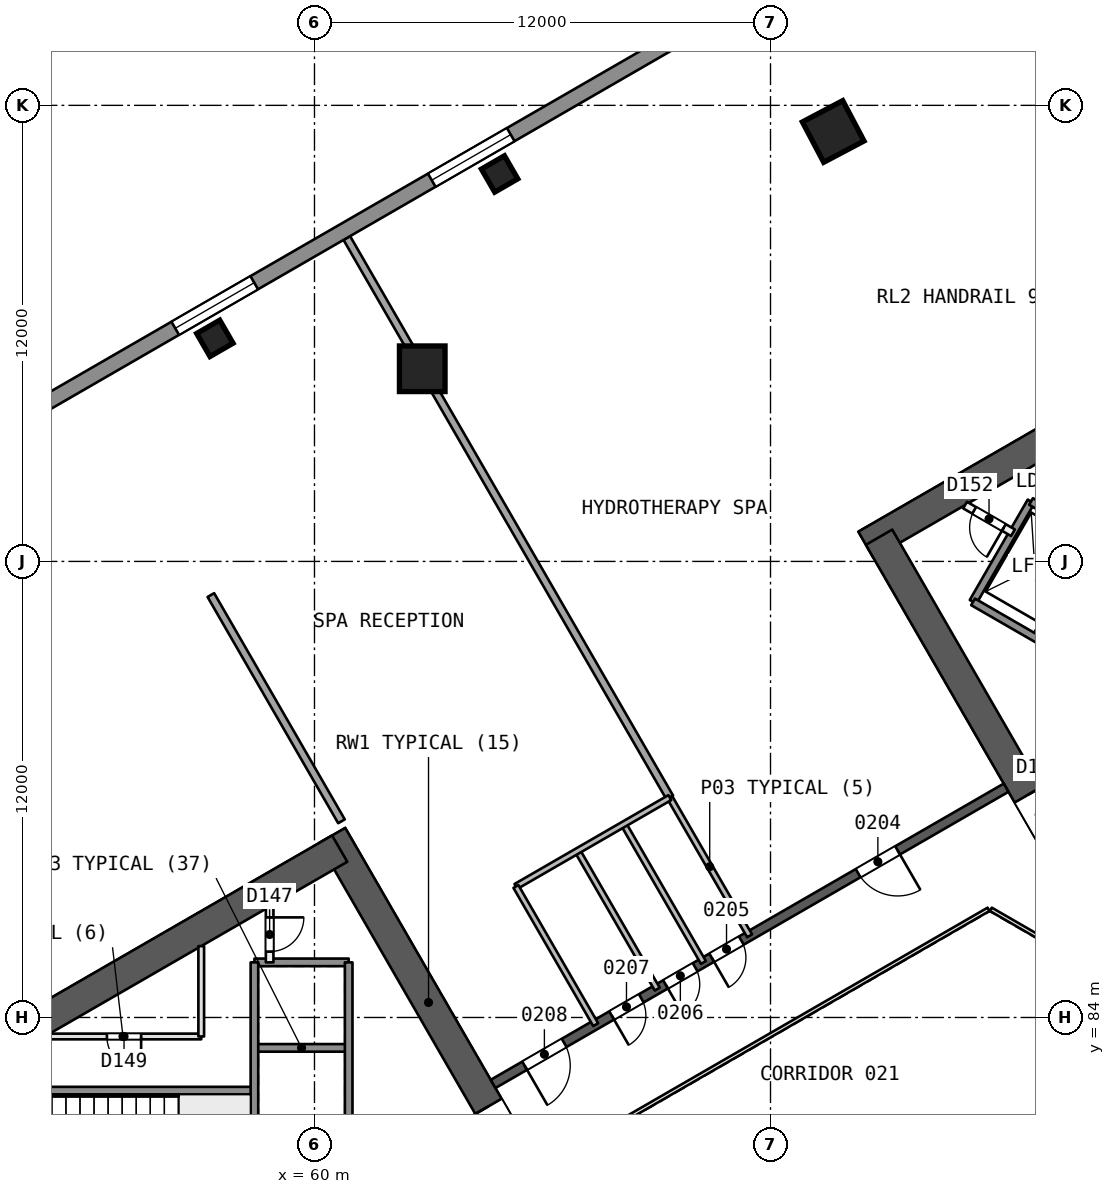
"""IFC4 building model, lengths in metres.
Left out: names, types, materials, properties, quantities, classifications, styles, units other than length and angle.
Written with IfcOpenShell. Run it as: python <this file> out.ifc"""

import sys

from ifc_helpers import new_model, si_unit, direction, frame, frame_2d, origin, origin_2d, place, context, subcontext, project, spatial, rectangle, extrude, element, fill, save


model = new_model("IFC4")
c1 = context("Model", 3, precision=1e-05, world=origin(), true_north=direction((0.0, 1.0)))
c2 = subcontext(c1, "Body", "Model", "MODEL_VIEW")
j1 = project(units=[si_unit("LENGTHUNIT", "METRE"), si_unit("PLANEANGLEUNIT", "RADIAN")], contexts=[c1])
p1 = place(None, origin())
s1 = spatial("IfcSite", under=j1, at=p1, CompositionType="ELEMENT")
p2 = place(p1, origin())
s2 = spatial("IfcBuilding", under=s1, at=p2, CompositionType="ELEMENT")
p3 = place(p2, frame((0.0, 0.0, 15.0)))
s3 = spatial("IfcBuildingStorey", under=s2, at=p3, CompositionType="ELEMENT", Elevation=15.0)
p4 = place(p3, frame((65.538, 80.0, 0.0), z_axis=(0.0, 0.0, 1.0), x_axis=(-0.49999662545, 0.866027352073, 0.0)))
e1 = element("IfcWall", 1, at=p4, inside=s3, PredefinedType="SHEAR", context=c2, shape_type="SweptSolid", body=[
    extrude(rectangle(XDim=10.149, YDim=0.8, at=frame_2d((5.074, 0.0))), origin(), (0.0, 0.0, 1.0), 5.4),
])
p5 = place(p4, frame((0.719, 0.0, 0.0)))
e2 = element("IfcOpeningElement", 2, at=p5, cuts=e1, PredefinedType="OPENING", context=c2, shape_type="SweptSolid", body=[
    extrude(rectangle(XDim=1.2, YDim=2.1, at=frame_2d((0.6, 1.05))), frame((0.0, 0.411, 0.0), z_axis=(0.0, -1.0, 0.0), x_axis=(1.0, 0.0, 0.0)), (0.0, 0.0, 1.0), 0.821),
])
p6 = place(p3, frame((60.664, 88.443, 0.0), z_axis=(0.0, 0.0, 1.0), x_axis=(-0.866029478545, -0.499992942241, 0.0)))
e3 = element("IfcWall", 3, at=p6, inside=s3, PredefinedType="SHEAR", context=c2, shape_type="SweptSolid", body=[
    extrude(rectangle(XDim=13.933, YDim=0.8, at=frame_2d((6.967, 0.0))), origin(), (0.0, 0.0, 1.0), 5.4),
])
p7 = place(p3, frame((86.723, 103.488, 0.0), z_axis=(0.0, 0.0, 1.0), x_axis=(-0.866032504327, -0.499987701298, 0.0)))
e4 = element("IfcWall", 4, at=p7, inside=s3, PredefinedType="SHEAR", context=c2, shape_type="SweptSolid", body=[
    extrude(rectangle(XDim=14.102, YDim=0.8, at=frame_2d((7.051, 0.0))), origin(), (0.0, 0.0, 1.0), 5.4),
])
p8 = place(p3, frame((74.856, 96.637, 0.0), z_axis=(0.0, 0.0, 1.0), x_axis=(0.499993500917, -0.866029155999, 0.0)))
e5 = element("IfcWall", 5, at=p8, inside=s3, PredefinedType="SHEAR", context=c2, shape_type="SweptSolid", body=[
    extrude(rectangle(XDim=9.98, YDim=0.8, at=frame_2d((4.99, 0.0))), origin(), (0.0, 0.0, 1.0), 5.4),
])
p9 = place(p8, frame((7.83, 0.0, 0.0)))
e6 = element("IfcOpeningElement", 6, at=p9, cuts=e5, PredefinedType="OPENING", context=c2, shape_type="SweptSolid", body=[
    extrude(rectangle(XDim=1.2, YDim=2.1, at=frame_2d((0.6, 1.05))), frame((0.0, 0.411, 0.0), z_axis=(0.0, -1.0, 0.0), x_axis=(1.0, 0.0, 0.0)), (0.0, 0.0, 1.0), 0.821),
])
p10 = place(p3, frame((78.2, 90.046, 0.0), z_axis=(0.0, 0.0, 1.0), x_axis=(-0.866026492143, -0.499998114903, 0.0)))
e7 = element("IfcWall", 7, at=p10, inside=s3, PredefinedType="SHEAR", context=c2, shape_type="SweptSolid", body=[
    extrude(rectangle(XDim=15.588, YDim=0.25, at=frame_2d((7.794, 0.0))), origin(), (0.0, 0.0, 1.0), 5.0),
])
p11 = place(p10, frame((3.297, 0.0, 0.0)))
e8 = element("IfcOpeningElement", 8, at=p11, cuts=e7, PredefinedType="OPENING", context=c2, shape_type="SweptSolid", body=[
    extrude(rectangle(XDim=1.2, YDim=2.4, at=frame_2d((0.6, 1.2))), frame((0.0, 0.135, 0.0), z_axis=(0.0, -1.0, 0.0), x_axis=(1.0, 0.0, 0.0)), (0.0, 0.0, 1.0), 0.271),
])
p12 = place(p10, frame((8.046, 0.0, 0.0)))
e9 = element("IfcOpeningElement", 9, at=p12, cuts=e7, PredefinedType="OPENING", context=c2, shape_type="SweptSolid", body=[
    extrude(rectangle(XDim=0.9, YDim=2.1, at=frame_2d((0.45, 1.05))), frame((0.0, 0.135, 0.0), z_axis=(0.0, -1.0, 0.0), x_axis=(1.0, 0.0, 0.0)), (0.0, 0.0, 1.0), 0.271),
])
p13 = place(p10, frame((9.449, 0.0, 0.0)))
e10 = element("IfcOpeningElement", 10, at=p13, cuts=e7, PredefinedType="OPENING", context=c2, shape_type="SweptSolid", body=[
    extrude(rectangle(XDim=0.9, YDim=2.1, at=frame_2d((0.45, 1.05))), frame((0.0, 0.135, 0.0), z_axis=(0.0, -1.0, 0.0), x_axis=(1.0, 0.0, 0.0)), (0.0, 0.0, 1.0), 0.271),
])
p14 = place(p10, frame((11.085, 0.0, 0.0)))
e11 = element("IfcOpeningElement", 11, at=p14, cuts=e7, PredefinedType="OPENING", context=c2, shape_type="SweptSolid", body=[
    extrude(rectangle(XDim=0.9, YDim=2.1, at=frame_2d((0.45, 1.05))), frame((0.0, 0.135, 0.0), z_axis=(0.0, -1.0, 0.0), x_axis=(1.0, 0.0, 0.0)), (0.0, 0.0, 1.0), 0.271),
])
p15 = place(p10, frame((13.43, 0.0, 0.0)))
e12 = element("IfcOpeningElement", 12, at=p15, cuts=e7, PredefinedType="OPENING", context=c2, shape_type="SweptSolid", body=[
    extrude(rectangle(XDim=1.2, YDim=2.4, at=frame_2d((0.6, 1.2))), frame((0.0, 0.135, 0.0), z_axis=(0.0, -1.0, 0.0), x_axis=(1.0, 0.0, 0.0)), (0.0, 0.0, 1.0), 0.271),
])
p16 = place(p3, frame((73.649, 107.34, 0.0), z_axis=(0.000858805594, -0.02278094838, 0.999740111651), x_axis=(0.865998283321, 0.499933588876, 0.010648004404)))
e13 = element("IfcColumn", 13, at=p16, inside=s3, PredefinedType="COLUMN", context=c2, shape_type="SweptSolid", body=[
    extrude(rectangle(XDim=1.2, YDim=1.2, at=origin_2d()), origin(), (0.0, 0.0, 1.0), 5.401),
])
p17 = place(p3, frame((62.823, 101.09, 0.0), z_axis=(0.010125436974, -0.017448297643, 0.999796495511), x_axis=(-0.501816772312, 0.864738665414, 0.020173437103)))
e14 = element("IfcColumn", 14, at=p17, inside=s3, PredefinedType="COLUMN", context=c2, shape_type="SweptSolid", body=[
    extrude(rectangle(XDim=1.2, YDim=1.2, at=origin_2d()), origin(), (0.0, 0.0, 1.0), 5.401),
])
for number, where, z_axis, x_axis in (
    (15, (64.871, 106.195, 0.0), (0.0, 0.0, 1.0), (0.866, 0.5, 0.0)),
    (16, (57.379, 101.869, 0.0), (0.0, 0.0, 1.0), (0.866, 0.5, 0.0)),
):
    element("IfcColumn", number, at=place(p3, frame(where, z_axis=z_axis, x_axis=x_axis)), inside=s3, PredefinedType="COLUMN", context=c2, shape_type="SweptSolid", body=[
        extrude(rectangle(XDim=0.7, YDim=0.7, at=origin_2d()), origin(), (0.0, 0.0, 1.0), 5.4),
    ])
p18 = place(p3, frame((69.35, 89.786, 0.0), z_axis=(0.0, 0.0, 1.0), x_axis=(0.499958946799, -0.866049104564, 0.0)))
e17 = element("IfcWall", 17, at=p18, inside=s3, PredefinedType="PARTITIONING", context=c2, shape_type="SweptSolid", body=[
    extrude(rectangle(XDim=4.2, YDim=0.15, at=frame_2d((2.1, 0.0))), origin(), (0.0, 0.0, 1.0), 5.0),
])
p19 = place(p3, frame((60.85, 104.51, 0.0), z_axis=(0.0, 0.0, 1.0), x_axis=(0.500003389066, -0.866023447097, 0.0)))
e18 = element("IfcWall", 18, at=p19, inside=s3, PredefinedType="PARTITIONING", context=c2, shape_type="SweptSolid", body=[
    extrude(rectangle(XDim=17.001, YDim=0.2, at=frame_2d((8.5, 0.0))), origin(), (0.0, 0.0, 1.0), 5.0),
])
p20 = place(p3, frame((68.135, 89.085, 0.0), z_axis=(0.0, 0.0, 1.0), x_axis=(0.500002543286, -0.866023935413, 0.0)))
e19 = element("IfcWall", 19, at=p20, inside=s3, PredefinedType="PARTITIONING", context=c2, shape_type="SweptSolid", body=[
    extrude(rectangle(XDim=4.2, YDim=0.15, at=frame_2d((2.1, 0.0))), origin(), (0.0, 0.0, 1.0), 5.0),
])
p21 = place(p3, frame((66.92, 88.383, 0.0), z_axis=(0.0, 0.0, 1.0), x_axis=(0.500027713859, -0.866009402589, 0.0)))
e20 = element("IfcWall", 20, at=p21, inside=s3, PredefinedType="PARTITIONING", context=c2, shape_type="SweptSolid", body=[
    extrude(rectangle(XDim=4.2, YDim=0.15, at=frame_2d((2.1, 0.0))), origin(), (0.0, 0.0, 1.0), 5.0),
])
p22 = place(p3, frame((69.351, 89.785, 0.0), z_axis=(0.0, 0.0, 1.0), x_axis=(-0.866040404911, -0.499974016386, 0.0)))
e21 = element("IfcWall", 21, at=p22, inside=s3, PredefinedType="PARTITIONING", context=c2, shape_type="SweptSolid", body=[
    extrude(rectangle(XDim=4.677, YDim=0.15, at=frame_2d((2.338, 0.0))), origin(), (0.0, 0.0, 1.0), 5.0),
])
p23 = place(p3, frame((65.301, 87.447, 0.0), z_axis=(0.0, 0.0, 1.0), x_axis=(0.499972428603, -0.866041321553, 0.0)))
e22 = element("IfcWall", 22, at=p23, inside=s3, PredefinedType="PARTITIONING", context=c2, shape_type="SweptSolid", body=[
    extrude(rectangle(XDim=4.199, YDim=0.15, at=frame_2d((2.1, 0.0))), origin(), (0.0, 0.0, 1.0), 5.0),
])
p24 = place(p3, frame((57.274, 95.115, 0.0), z_axis=(0.0, 0.0, 1.0), x_axis=(0.499985838573, -0.866033579734, 0.0)))
e23 = element("IfcWall", 23, at=p24, inside=s3, PredefinedType="PARTITIONING", context=c2, shape_type="SweptSolid", body=[
    extrude(rectangle(XDim=6.874, YDim=0.2, at=frame_2d((3.437, 0.0))), origin(), (0.0, 0.0, 1.0), 5.0),
])
p25 = place(p3, frame((26.66, 85.0, 0.0), z_axis=(0.0, 0.0, 1.0), x_axis=(0.866025599265, 0.499999661418, 0.0)))
e24 = element("IfcWall", 24, at=p25, inside=s3, PredefinedType="SOLIDWALL", context=c2, shape_type="SweptSolid", body=[
    extrude(rectangle(XDim=78.727, YDim=0.4, at=frame_2d((39.364, 0.0))), origin(), (0.0, 0.0, 1.0), 5.0),
])
p26 = place(p25, frame((42.061, 0.0, 0.9)))
e25 = element("IfcOpeningElement", 25, at=p26, cuts=e24, PredefinedType="OPENING", context=c2, shape_type="SweptSolid", body=[
    extrude(rectangle(XDim=2.4, YDim=2.4, at=frame_2d((1.2, 1.2))), frame((0.0, 0.21, 0.0), z_axis=(0.0, -1.0, 0.0), x_axis=(1.0, 0.0, 0.0)), (0.0, 0.0, 1.0), 0.421),
])
p27 = place(p25, frame((34.267, 0.0, 0.9)))
e26 = element("IfcOpeningElement", 26, at=p27, cuts=e24, PredefinedType="OPENING", context=c2, shape_type="SweptSolid", body=[
    extrude(rectangle(XDim=2.4, YDim=2.4, at=frame_2d((1.2, 1.2))), frame((0.0, 0.21, 0.0), z_axis=(0.0, -1.0, 0.0), x_axis=(1.0, 0.0, 0.0)), (0.0, 0.0, 1.0), 0.421),
])
p28 = place(p3, frame((60.9, 85.45, 0.0), z_axis=(0.0, 0.0, 1.0), x_axis=(-1.0, 0.0, 0.0)))
e27 = element("IfcWall", 27, at=p28, inside=s3, PredefinedType="SOLIDWALL", context=c2, shape_type="SweptSolid", body=[
    extrude(rectangle(XDim=2.48, YDim=0.2, at=frame_2d((1.24, 0.0))), origin(), (0.0, 0.0, 1.0), 5.0),
])
p29 = place(p3, frame((57.02, 83.5, 0.0), z_axis=(0.0, 0.0, 1.0), x_axis=(-1.0, 0.0, 0.0)))
e28 = element("IfcWall", 28, at=p29, inside=s3, PredefinedType="PARTITIONING", context=c2, shape_type="SweptSolid", body=[
    extrude(rectangle(XDim=4.118, YDim=0.15, at=frame_2d((2.059, 0.0))), origin(), (0.0, 0.0, 1.0), 5.0),
])
p30 = place(p29, frame((1.582, 0.0, 0.0)))
e29 = element("IfcOpeningElement", 29, at=p30, cuts=e28, PredefinedType="OPENING", context=c2, shape_type="SweptSolid", body=[
    extrude(rectangle(XDim=0.9, YDim=2.1, at=frame_2d((0.45, 1.05))), frame((0.0, 0.085, 0.0), z_axis=(0.0, -1.0, 0.0), x_axis=(1.0, 0.0, 0.0)), (0.0, 0.0, 1.0), 0.171),
])
p31 = place(p3, frame((60.9, 83.2, 0.0), z_axis=(0.0, 0.0, 1.0), x_axis=(-1.0, 0.0, 0.0)))
e30 = element("IfcWall", 30, at=p31, inside=s3, PredefinedType="SOLIDWALL", context=c2, shape_type="SweptSolid", body=[
    extrude(rectangle(XDim=2.48, YDim=0.2, at=frame_2d((1.24, 0.0))), origin(), (0.0, 0.0, 1.0), 5.0),
])
p32 = place(p3, frame((58.42, 82.075, 0.0), z_axis=(0.0, 0.0, 1.0), x_axis=(-1.0, 0.0, 0.0)))
e31 = element("IfcWall", 31, at=p32, inside=s3, PredefinedType="SOLIDWALL", context=c2, shape_type="SweptSolid", body=[
    extrude(rectangle(XDim=7.7, YDim=0.2, at=frame_2d((3.85, 0.0))), origin(), (0.0, 0.0, 1.0), 5.0),
])
p33 = place(p3, frame((60.9, 85.45, 0.0), z_axis=(0.0, 0.0, 1.0), x_axis=(0.0, -1.0, 0.0)))
e32 = element("IfcWall", 32, at=p33, inside=s3, PredefinedType="SOLIDWALL", context=c2, shape_type="SweptSolid", body=[
    extrude(rectangle(XDim=10.9, YDim=0.2, at=frame_2d((5.45, 0.0))), origin(), (0.0, 0.0, 1.0), 5.0),
])
p34 = place(p3, frame((58.82, 86.917, 0.0), z_axis=(0.0, 0.0, 1.0), x_axis=(0.0, -1.0, 0.0)))
e33 = element("IfcWall", 33, at=p34, inside=s3, PredefinedType="PARTITIONING", context=c2, shape_type="SweptSolid", body=[
    extrude(rectangle(XDim=1.467, YDim=0.2, at=frame_2d((0.733, 0.0))), origin(), (0.0, 0.0, 1.0), 5.0),
])
p35 = place(p34, frame((0.283, 0.0, 0.0)))
e34 = element("IfcOpeningElement", 34, at=p35, cuts=e33, PredefinedType="OPENING", context=c2, shape_type="SweptSolid", body=[
    extrude(rectangle(XDim=0.9, YDim=2.1, at=frame_2d((0.45, 1.05))), frame((0.0, 0.11, 0.0), z_axis=(0.0, -1.0, 0.0), x_axis=(1.0, 0.0, 0.0)), (0.0, 0.0, 1.0), 0.221),
])
p36 = place(p3, frame((58.42, 85.45, 0.0), z_axis=(0.0, 0.0, 1.0), x_axis=(0.0, -1.0, 0.0)))
e35 = element("IfcWall", 35, at=p36, inside=s3, PredefinedType="SOLIDWALL", context=c2, shape_type="SweptSolid", body=[
    extrude(rectangle(XDim=9.0, YDim=0.2, at=frame_2d((4.5, 0.0))), origin(), (0.0, 0.0, 1.0), 5.0),
])
p37 = place(p3, frame((57.02, 85.877, 0.0), z_axis=(0.0, 0.0, 1.0), x_axis=(0.0, -1.0, 0.0)))
e36 = element("IfcWall", 36, at=p37, inside=s3, PredefinedType="PARTITIONING", context=c2, shape_type="SweptSolid", body=[
    extrude(rectangle(XDim=2.377, YDim=0.15, at=frame_2d((1.189, 0.0))), origin(), (0.0, 0.0, 1.0), 5.0),
])
for number, where, z_axis, x_axis in (
    (37, (78.976, 93.986, 0.0), (0.0, 0.0, 1.0), (0.5, 0.866, 0.0)),
    (38, (77.33, 94.936, 0.0), (0.0, 0.0, 1.0), (0.5, 0.866, 0.0)),
):
    element("IfcWall", number, at=place(p3, frame(where, z_axis=z_axis, x_axis=x_axis)), inside=s3, PredefinedType="SOLIDWALL", context=c2, shape_type="SweptSolid", body=[
        extrude(rectangle(XDim=3.05, YDim=0.2, at=frame_2d((1.525, 0.0))), origin(), (0.0, 0.0, 1.0), 5.0),
    ])
p38 = place(p3, frame((86.77, 89.486, 0.0), z_axis=(0.0, 0.0, 1.0), x_axis=(-0.86601811187, 0.500012629753, 0.0)))
e39 = element("IfcWall", 39, at=p38, inside=s3, PredefinedType="SOLIDWALL", context=c2, shape_type="SweptSolid", body=[
    extrude(rectangle(XDim=10.9, YDim=0.2, at=frame_2d((5.45, 0.0))), origin(), (0.0, 0.0, 1.0), 5.0),
])
p39 = place(p3, frame((78.38, 96.755, 0.0), z_axis=(0.0, 0.0, 1.0), x_axis=(-0.866003949776, 0.500037157592, 0.0)))
e40 = element("IfcWall", 40, at=p39, inside=s3, PredefinedType="PARTITIONING", context=c2, shape_type="SweptSolid", body=[
    extrude(rectangle(XDim=1.455, YDim=0.2, at=frame_2d((0.728, 0.0))), origin(), (0.0, 0.0, 1.0), 5.0),
])
p40 = place(p39, frame((0.278, 0.0, 0.0)))
e41 = element("IfcOpeningElement", 41, at=p40, cuts=e40, PredefinedType="OPENING", context=c2, shape_type="SweptSolid", body=[
    extrude(rectangle(XDim=0.9, YDim=2.1, at=frame_2d((0.45, 1.05))), frame((0.0, 0.11, 0.0), z_axis=(0.0, -1.0, 0.0), x_axis=(1.0, 0.0, 0.0)), (0.0, 0.0, 1.0), 0.221),
])
p41 = place(p3, frame((80.5, 96.627, 0.0), z_axis=(0.0, 0.0, 1.0), x_axis=(-0.86601224135, 0.500022797313, 0.0)))
e42 = element("IfcWall", 42, at=p41, inside=s3, PredefinedType="SOLIDWALL", context=c2, shape_type="SweptSolid", body=[
    extrude(rectangle(XDim=1.9, YDim=0.2, at=frame_2d((0.95, 0.0))), origin(), (0.0, 0.0, 1.0), 5.0),
])
p42 = place(p41, frame((0.4, 0.0, 0.0)))
e43 = element("IfcOpeningElement", 43, at=p42, cuts=e42, PredefinedType="OPENING", context=c2, shape_type="SweptSolid", body=[
    extrude(rectangle(XDim=1.1, YDim=2.1, at=frame_2d((0.55, 1.05))), frame((0.0, 0.11, 0.0), z_axis=(0.0, -1.0, 0.0), x_axis=(1.0, 0.0, 0.0)), (0.0, 0.0, 1.0), 0.221),
])
p43 = place(p3, frame((79.53, 85.846, 0.0), z_axis=(0.0, 0.0, 1.0), x_axis=(-0.866041268327, 0.499972520799, 0.0)))
e44 = element("IfcWall", 44, at=p43, inside=s3, PredefinedType="PARTITIONING", context=c2, shape_type="SweptSolid", body=[
    extrude(rectangle(XDim=2.0, YDim=0.1, at=frame_2d((1.0, 0.0))), origin(), (0.0, 0.0, 1.0), 5.0),
])
p44 = place(p3, frame((77.738, 86.846, 0.0), z_axis=(0.0, 0.0, 1.0), x_axis=(-0.866026658274, -0.499997827154, 0.0)))
e45 = element("IfcWall", 45, at=p44, inside=s3, PredefinedType="PARTITIONING", context=c2, shape_type="SweptSolid", body=[
    extrude(rectangle(XDim=11.588, YDim=0.1, at=frame_2d((5.794, 0.0))), origin(), (0.0, 0.0, 1.0), 5.0),
])
p45 = place(p11, origin())
e46 = element("IfcDoor", 46, at=p45, inside=s3, OperationType="SINGLE_SWING_LEFT", PredefinedType="NOTDEFINED", context=c2, shape_type="SweptSolid", body=[
    extrude(rectangle(XDim=1.2, YDim=2.4, at=frame_2d((0.6, 1.2))), frame((0.0, 0.025, 0.0), z_axis=(0.0, -1.0, 0.0), x_axis=(1.0, 0.0, 0.0)), (0.0, 0.0, 1.0), 0.05),
])
fill(e8, e46)
p46 = place(p12, origin())
e47 = element("IfcDoor", 47, at=p46, inside=s3, OperationType="SINGLE_SWING_RIGHT", PredefinedType="NOTDEFINED", context=c2, shape_type="SweptSolid", body=[
    extrude(rectangle(XDim=0.9, YDim=2.1, at=frame_2d((0.45, 1.05))), frame((0.0, 0.025, 0.0), z_axis=(0.0, -1.0, 0.0), x_axis=(1.0, 0.0, 0.0)), (0.0, 0.0, 1.0), 0.05),
])
fill(e9, e47)
p47 = place(p13, origin())
e48 = element("IfcDoor", 48, at=p47, inside=s3, OperationType="SINGLE_SWING_RIGHT", PredefinedType="NOTDEFINED", context=c2, shape_type="SweptSolid", body=[
    extrude(rectangle(XDim=0.9, YDim=2.1, at=frame_2d((0.45, 1.05))), frame((0.0, 0.025, 0.0), z_axis=(0.0, -1.0, 0.0), x_axis=(1.0, 0.0, 0.0)), (0.0, 0.0, 1.0), 0.05),
])
fill(e10, e48)
p48 = place(p14, origin())
e49 = element("IfcDoor", 49, at=p48, inside=s3, OperationType="SINGLE_SWING_RIGHT", PredefinedType="NOTDEFINED", context=c2, shape_type="SweptSolid", body=[
    extrude(rectangle(XDim=0.9, YDim=2.1, at=frame_2d((0.45, 1.05))), frame((0.0, 0.025, 0.0), z_axis=(0.0, -1.0, 0.0), x_axis=(1.0, 0.0, 0.0)), (0.0, 0.0, 1.0), 0.05),
])
fill(e11, e49)
p49 = place(p15, origin())
e50 = element("IfcDoor", 50, at=p49, inside=s3, OperationType="SINGLE_SWING_RIGHT", PredefinedType="NOTDEFINED", context=c2, shape_type="SweptSolid", body=[
    extrude(rectangle(XDim=1.2, YDim=2.4, at=frame_2d((0.6, 1.2))), frame((0.0, 0.025, 0.0), z_axis=(0.0, -1.0, 0.0), x_axis=(1.0, 0.0, 0.0)), (0.0, 0.0, 1.0), 0.05),
])
fill(e12, e50)
p50 = place(p26, origin())
e51 = element("IfcWindow", 51, at=p50, inside=s3, PartitioningType="SINGLE_PANEL", PredefinedType="WINDOW", context=c2, shape_type="SweptSolid", body=[
    extrude(rectangle(XDim=2.4, YDim=2.4, at=frame_2d((1.2, 1.2))), frame((0.0, 0.03, 0.0), z_axis=(0.0, -1.0, 0.0), x_axis=(1.0, 0.0, 0.0)), (0.0, 0.0, 1.0), 0.06),
])
fill(e25, e51)
p51 = place(p27, origin())
e52 = element("IfcWindow", 52, at=p51, inside=s3, PartitioningType="SINGLE_PANEL", PredefinedType="WINDOW", context=c2, shape_type="SweptSolid", body=[
    extrude(rectangle(XDim=2.4, YDim=2.4, at=frame_2d((1.2, 1.2))), frame((0.0, 0.03, 0.0), z_axis=(0.0, -1.0, 0.0), x_axis=(1.0, 0.0, 0.0)), (0.0, 0.0, 1.0), 0.06),
])
fill(e26, e52)
p52 = place(p5, origin())
e53 = element("IfcDoor", 53, at=p52, inside=s3, OperationType="SINGLE_SWING_RIGHT", PredefinedType="NOTDEFINED", context=c2, shape_type="SweptSolid", body=[
    extrude(rectangle(XDim=1.2, YDim=2.1, at=frame_2d((0.6, 1.05))), frame((0.0, 0.025, 0.0), z_axis=(0.0, -1.0, 0.0), x_axis=(1.0, 0.0, 0.0)), (0.0, 0.0, 1.0), 0.05),
])
fill(e2, e53)
p53 = place(p35, origin())
e54 = element("IfcDoor", 54, at=p53, inside=s3, OperationType="SINGLE_SWING_LEFT", PredefinedType="NOTDEFINED", context=c2, shape_type="SweptSolid", body=[
    extrude(rectangle(XDim=0.9, YDim=2.1, at=frame_2d((0.45, 1.05))), frame((0.0, 0.025, 0.0), z_axis=(0.0, -1.0, 0.0), x_axis=(1.0, 0.0, 0.0)), (0.0, 0.0, 1.0), 0.05),
])
fill(e34, e54)
p54 = place(p30, origin())
e55 = element("IfcDoor", 55, at=p54, inside=s3, OperationType="SINGLE_SWING_LEFT", PredefinedType="NOTDEFINED", context=c2, shape_type="SweptSolid", body=[
    extrude(rectangle(XDim=0.9, YDim=2.1, at=frame_2d((0.45, 1.05))), frame((0.0, 0.025, 0.0), z_axis=(0.0, -1.0, 0.0), x_axis=(1.0, 0.0, 0.0)), (0.0, 0.0, 1.0), 0.05),
])
fill(e29, e55)
p55 = place(p9, origin())
e56 = element("IfcDoor", 56, at=p55, inside=s3, OperationType="SINGLE_SWING_LEFT", PredefinedType="NOTDEFINED", context=c2, shape_type="SweptSolid", body=[
    extrude(rectangle(XDim=1.2, YDim=2.1, at=frame_2d((0.6, 1.05))), frame((0.0, 0.025, 0.0), z_axis=(0.0, -1.0, 0.0), x_axis=(1.0, 0.0, 0.0)), (0.0, 0.0, 1.0), 0.05),
])
fill(e6, e56)
p56 = place(p40, origin())
e57 = element("IfcDoor", 57, at=p56, inside=s3, OperationType="SINGLE_SWING_LEFT", PredefinedType="NOTDEFINED", context=c2, shape_type="SweptSolid", body=[
    extrude(rectangle(XDim=0.9, YDim=2.1, at=frame_2d((0.45, 1.05))), frame((0.0, 0.025, 0.0), z_axis=(0.0, -1.0, 0.0), x_axis=(1.0, 0.0, 0.0)), (0.0, 0.0, 1.0), 0.05),
])
fill(e41, e57)
save(model, sys.argv[1])
